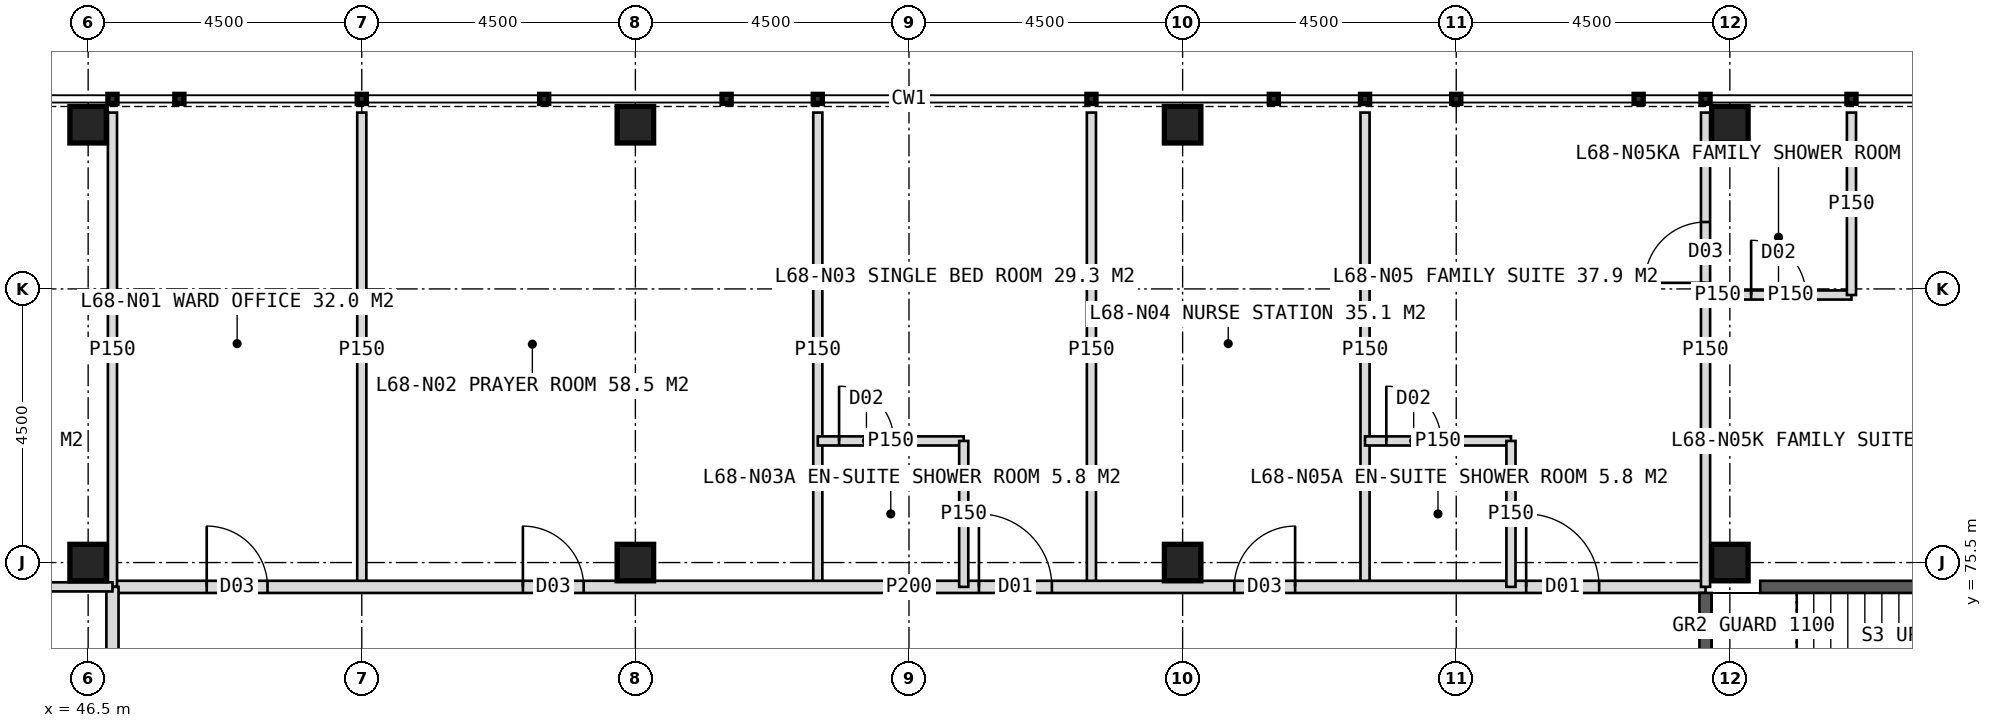
"""IFC4 building model, lengths in metres.
Left out: names, types, materials, properties, quantities, classifications, styles, units other than length and angle.
Written with IfcOpenShell. Run it as: python <this file> out.ifc"""

import sys

from ifc_helpers import new_model, si_unit, direction, frame, frame_2d, origin, origin_2d, place, context, subcontext, project, spatial, rectangle, hollow_rectangle, extrude, element, fill, save


model = new_model("IFC4")
c1 = context("Model", 3, precision=1e-05, world=origin(), true_north=direction((0.0, 1.0)))
c2 = subcontext(c1, "Body", "Model", "MODEL_VIEW")
j1 = project(units=[si_unit("LENGTHUNIT", "METRE"), si_unit("PLANEANGLEUNIT", "RADIAN")], contexts=[c1])
p1 = place(None, origin())
s1 = spatial("IfcSite", under=j1, at=p1, CompositionType="ELEMENT")
p2 = place(p1, origin())
s2 = spatial("IfcBuilding", under=s1, at=p2, CompositionType="ELEMENT")
p3 = place(p2, frame((0.0, 0.0, 282.0)))
s3 = spatial("IfcBuildingStorey", under=s2, at=p3, CompositionType="ELEMENT", Elevation=282.0)
for number, where, z_axis, x_axis in (
    (1, (73.5, 75.5, 0.0), (0.0, 0.0, 1.0), (1.0, 0.0, 0.0)),
    (2, (46.5, 75.5, 0.0), (0.0, 0.0, 1.0), (1.0, 0.0, 0.0)),
    (3, (55.5, 75.5, 0.0), (0.0, 0.0, 1.0), (1.0, 0.0, 0.0)),
    (4, (64.5, 75.5, 0.0), (0.0, 0.0, 1.0), (1.0, 0.0, 0.0)),
    (5, (46.5, 82.7, 0.0), (0.0, 0.0, 1.0), (1.0, 0.0, 0.0)),
    (6, (55.5, 82.7, 0.0), (0.0, 0.0, 1.0), (1.0, 0.0, 0.0)),
    (7, (64.5, 82.7, 0.0), (0.0, 0.0, 1.0), (1.0, 0.0, 0.0)),
    (8, (73.5, 82.7, 0.0), (0.0, 0.0, 1.0), (1.0, 0.0, 0.0)),
):
    element("IfcColumn", number, at=place(p3, frame(where, z_axis=z_axis, x_axis=x_axis)), inside=s3, PredefinedType="COLUMN", context=c2, shape_type="SweptSolid", body=[
        extrude(hollow_rectangle(XDim=0.6, YDim=0.6, WallThickness=0.04, at=origin_2d()), origin(), (0.0, 0.0, 1.0), 4.0),
    ])
for number, where, z_axis, x_axis in (
    (9, (51.0, 75.1, 0.0), (0.0, 0.0, 1.0), (0.0, 1.0, 0.0)),
    (10, (58.5, 75.1, 0.0), (0.0, 0.0, 1.0), (0.0, 1.0, 0.0)),
    (11, (63.0, 75.1, 0.0), (0.0, 0.0, 1.0), (0.0, 1.0, 0.0)),
    (12, (67.5, 75.1, 0.0), (0.0, 0.0, 1.0), (0.0, 1.0, 0.0)),
):
    element("IfcWall", number, at=place(p3, frame(where, z_axis=z_axis, x_axis=x_axis)), inside=s3, PredefinedType="PARTITIONING", context=c2, shape_type="SweptSolid", body=[
        extrude(rectangle(XDim=7.8, YDim=0.15, at=frame_2d((3.9, 0.0))), origin(), (0.0, 0.0, 1.0), 3.75),
    ])
p4 = place(p3, frame((46.9, 75.1, 0.0), z_axis=(0.0, 0.0, 1.0), x_axis=(1.0, 0.0, 0.0)))
e13 = element("IfcWall", 13, at=p4, inside=s3, PredefinedType="PARTITIONING", context=c2, shape_type="SweptSolid", body=[
    extrude(rectangle(XDim=26.2, YDim=0.2, at=frame_2d((13.1, 0.0))), origin(), (0.0, 0.0, 1.0), 3.75),
])
p5 = place(p4, frame((1.55, 0.0, 0.0)))
e14 = element("IfcOpeningElement", 14, at=p5, cuts=e13, PredefinedType="OPENING", context=c2, shape_type="SweptSolid", body=[
    extrude(rectangle(XDim=1.0, YDim=2.1, at=frame_2d((0.5, 1.05))), frame((0.0, 0.11, 0.0), z_axis=(0.0, -1.0, 0.0), x_axis=(1.0, 0.0, 0.0)), (0.0, 0.0, 1.0), 0.22),
])
p6 = place(p4, frame((6.75, 0.0, 0.0)))
e15 = element("IfcOpeningElement", 15, at=p6, cuts=e13, PredefinedType="OPENING", context=c2, shape_type="SweptSolid", body=[
    extrude(rectangle(XDim=1.0, YDim=2.1, at=frame_2d((0.5, 1.05))), frame((0.0, 0.11, 0.0), z_axis=(0.0, -1.0, 0.0), x_axis=(1.0, 0.0, 0.0)), (0.0, 0.0, 1.0), 0.22),
])
p7 = place(p4, frame((14.25, 0.0, 0.0)))
e16 = element("IfcOpeningElement", 16, at=p7, cuts=e13, PredefinedType="OPENING", context=c2, shape_type="SweptSolid", body=[
    extrude(rectangle(XDim=1.2, YDim=2.2, at=frame_2d((0.6, 1.1))), frame((0.0, 0.11, 0.0), z_axis=(0.0, -1.0, 0.0), x_axis=(1.0, 0.0, 0.0)), (0.0, 0.0, 1.0), 0.22),
])
p8 = place(p4, frame((18.45, 0.0, 0.0)))
e17 = element("IfcOpeningElement", 17, at=p8, cuts=e13, PredefinedType="OPENING", context=c2, shape_type="SweptSolid", body=[
    extrude(rectangle(XDim=1.0, YDim=2.1, at=frame_2d((0.5, 1.05))), frame((0.0, 0.11, 0.0), z_axis=(0.0, -1.0, 0.0), x_axis=(1.0, 0.0, 0.0)), (0.0, 0.0, 1.0), 0.22),
])
p9 = place(p4, frame((23.25, 0.0, 0.0)))
e18 = element("IfcOpeningElement", 18, at=p9, cuts=e13, PredefinedType="OPENING", context=c2, shape_type="SweptSolid", body=[
    extrude(rectangle(XDim=1.2, YDim=2.2, at=frame_2d((0.6, 1.1))), frame((0.0, 0.11, 0.0), z_axis=(0.0, -1.0, 0.0), x_axis=(1.0, 0.0, 0.0)), (0.0, 0.0, 1.0), 0.22),
])
p10 = place(p3, frame((46.9, 75.1, 0.0), z_axis=(0.0, 0.0, 1.0), x_axis=(0.0, 1.0, 0.0)))
e19 = element("IfcWall", 19, at=p10, inside=s3, PredefinedType="PARTITIONING", context=c2, shape_type="SweptSolid", body=[
    extrude(rectangle(XDim=7.8, YDim=0.15, at=frame_2d((3.9, 0.0))), origin(), (0.0, 0.0, 1.0), 3.75),
])
p11 = place(p3, frame((58.5, 77.5, 0.0), z_axis=(0.0, 0.0, 1.0), x_axis=(1.0, 0.0, 0.0)))
e20 = element("IfcWall", 20, at=p11, inside=s3, PredefinedType="PARTITIONING", context=c2, shape_type="SweptSolid", body=[
    extrude(rectangle(XDim=2.4, YDim=0.15, at=frame_2d((1.2, 0.0))), origin(), (0.0, 0.0, 1.0), 3.75),
])
p12 = place(p11, frame((0.35, 0.0, 0.0)))
e21 = element("IfcOpeningElement", 21, at=p12, cuts=e20, PredefinedType="OPENING", context=c2, shape_type="SweptSolid", body=[
    extrude(rectangle(XDim=0.9, YDim=2.1, at=frame_2d((0.45, 1.05))), frame((0.0, 0.085, 0.0), z_axis=(0.0, -1.0, 0.0), x_axis=(1.0, 0.0, 0.0)), (0.0, 0.0, 1.0), 0.17),
])
p13 = place(p3, frame((60.9, 75.1, 0.0), z_axis=(0.0, 0.0, 1.0), x_axis=(0.0, 1.0, 0.0)))
e22 = element("IfcWall", 22, at=p13, inside=s3, PredefinedType="PARTITIONING", context=c2, shape_type="SweptSolid", body=[
    extrude(rectangle(XDim=2.4, YDim=0.15, at=frame_2d((1.2, 0.0))), origin(), (0.0, 0.0, 1.0), 3.75),
])
p14 = place(p3, frame((73.1, 75.1, 0.0), z_axis=(0.0, 0.0, 1.0), x_axis=(0.0, 1.0, 0.0)))
e23 = element("IfcWall", 23, at=p14, inside=s3, PredefinedType="PARTITIONING", context=c2, shape_type="SweptSolid", body=[
    extrude(rectangle(XDim=7.8, YDim=0.15, at=frame_2d((3.9, 0.0))), origin(), (0.0, 0.0, 1.0), 3.75),
])
p15 = place(p14, frame((5.0, 0.0, 0.0)))
e24 = element("IfcOpeningElement", 24, at=p15, cuts=e23, PredefinedType="OPENING", context=c2, shape_type="SweptSolid", body=[
    extrude(rectangle(XDim=1.0, YDim=2.1, at=frame_2d((0.5, 1.05))), frame((0.0, 0.085, 0.0), z_axis=(0.0, -1.0, 0.0), x_axis=(1.0, 0.0, 0.0)), (0.0, 0.0, 1.0), 0.17),
])
p16 = place(p3, frame((73.1, 79.9, 0.0), z_axis=(0.0, 0.0, 1.0), x_axis=(1.0, 0.0, 0.0)))
e25 = element("IfcWall", 25, at=p16, inside=s3, PredefinedType="PARTITIONING", context=c2, shape_type="SweptSolid", body=[
    extrude(rectangle(XDim=0.4, YDim=0.15, at=frame_2d((0.2, 0.0))), origin(), (0.0, 0.0, 1.0), 3.75),
])
p17 = place(p3, frame((73.5, 79.9, 0.0), z_axis=(0.0, 0.0, 1.0), x_axis=(1.0, 0.0, 0.0)))
e26 = element("IfcWall", 26, at=p17, inside=s3, PredefinedType="PARTITIONING", context=c2, shape_type="SweptSolid", body=[
    extrude(rectangle(XDim=2.0, YDim=0.15, at=frame_2d((1.0, 0.0))), origin(), (0.0, 0.0, 1.0), 2.95),
])
p18 = place(p17, frame((0.35, 0.0, 0.0)))
e27 = element("IfcOpeningElement", 27, at=p18, cuts=e26, PredefinedType="OPENING", context=c2, shape_type="SweptSolid", body=[
    extrude(rectangle(XDim=0.9, YDim=2.1, at=frame_2d((0.45, 1.05))), frame((0.0, 0.085, 0.0), z_axis=(0.0, -1.0, 0.0), x_axis=(1.0, 0.0, 0.0)), (0.0, 0.0, 1.0), 0.17),
])
p19 = place(p3, frame((75.5, 79.9, 0.0), z_axis=(0.0, 0.0, 1.0), x_axis=(0.0, 1.0, 0.0)))
e28 = element("IfcWall", 28, at=p19, inside=s3, PredefinedType="PARTITIONING", context=c2, shape_type="SweptSolid", body=[
    extrude(rectangle(XDim=3.0, YDim=0.15, at=frame_2d((1.5, 0.0))), origin(), (0.0, 0.0, 1.0), 3.75),
])
p20 = place(p3, frame((67.5, 77.5, 0.0), z_axis=(0.0, 0.0, 1.0), x_axis=(1.0, 0.0, 0.0)))
e29 = element("IfcWall", 29, at=p20, inside=s3, PredefinedType="PARTITIONING", context=c2, shape_type="SweptSolid", body=[
    extrude(rectangle(XDim=2.4, YDim=0.15, at=frame_2d((1.2, 0.0))), origin(), (0.0, 0.0, 1.0), 3.75),
])
p21 = place(p20, frame((0.35, 0.0, 0.0)))
e30 = element("IfcOpeningElement", 30, at=p21, cuts=e29, PredefinedType="OPENING", context=c2, shape_type="SweptSolid", body=[
    extrude(rectangle(XDim=0.9, YDim=2.1, at=frame_2d((0.45, 1.05))), frame((0.0, 0.085, 0.0), z_axis=(0.0, -1.0, 0.0), x_axis=(1.0, 0.0, 0.0)), (0.0, 0.0, 1.0), 0.17),
])
p22 = place(p3, frame((69.9, 75.1, 0.0), z_axis=(0.0, 0.0, 1.0), x_axis=(0.0, 1.0, 0.0)))
e31 = element("IfcWall", 31, at=p22, inside=s3, PredefinedType="PARTITIONING", context=c2, shape_type="SweptSolid", body=[
    extrude(rectangle(XDim=2.4, YDim=0.15, at=frame_2d((1.2, 0.0))), origin(), (0.0, 0.0, 1.0), 3.75),
])
p23 = place(p3, frame((46.9, 48.9, 0.0), z_axis=(0.0, 0.0, 1.0), x_axis=(0.0, 1.0, 0.0)))
e32 = element("IfcWall", 32, at=p23, inside=s3, PredefinedType="PARTITIONING", context=c2, shape_type="SweptSolid", body=[
    extrude(rectangle(XDim=26.2, YDim=0.2, at=frame_2d((13.1, 0.0))), origin(), (0.0, 0.0, 1.0), 3.75),
])
p24 = place(p23, frame((1.55, 0.0, 0.0)))
e33 = element("IfcOpeningElement", 33, at=p24, cuts=e32, PredefinedType="OPENING", context=c2, shape_type="SweptSolid", body=[
    extrude(rectangle(XDim=1.0, YDim=2.1, at=frame_2d((0.5, 1.05))), frame((0.0, 0.11, 0.0), z_axis=(0.0, -1.0, 0.0), x_axis=(1.0, 0.0, 0.0)), (0.0, 0.0, 1.0), 0.22),
])
p25 = place(p23, frame((6.6, 0.0, 0.0)))
e34 = element("IfcOpeningElement", 34, at=p25, cuts=e32, PredefinedType="OPENING", context=c2, shape_type="SweptSolid", body=[
    extrude(rectangle(XDim=1.0, YDim=2.1, at=frame_2d((0.5, 1.05))), frame((0.0, 0.11, 0.0), z_axis=(0.0, -1.0, 0.0), x_axis=(1.0, 0.0, 0.0)), (0.0, 0.0, 1.0), 0.22),
])
p26 = place(p23, frame((11.1, 0.0, 0.0)))
e35 = element("IfcOpeningElement", 35, at=p26, cuts=e32, PredefinedType="OPENING", context=c2, shape_type="SweptSolid", body=[
    extrude(rectangle(XDim=1.0, YDim=2.1, at=frame_2d((0.5, 1.05))), frame((0.0, 0.11, 0.0), z_axis=(0.0, -1.0, 0.0), x_axis=(1.0, 0.0, 0.0)), (0.0, 0.0, 1.0), 0.22),
])
p27 = place(p23, frame((18.45, 0.0, 0.0)))
e36 = element("IfcOpeningElement", 36, at=p27, cuts=e32, PredefinedType="OPENING", context=c2, shape_type="SweptSolid", body=[
    extrude(rectangle(XDim=1.2, YDim=2.2, at=frame_2d((0.6, 1.1))), frame((0.0, 0.11, 0.0), z_axis=(0.0, -1.0, 0.0), x_axis=(1.0, 0.0, 0.0)), (0.0, 0.0, 1.0), 0.22),
])
p28 = place(p23, frame((22.9, 0.0, 0.0)))
e37 = element("IfcOpeningElement", 37, at=p28, cuts=e32, PredefinedType="OPENING", context=c2, shape_type="SweptSolid", body=[
    extrude(rectangle(XDim=1.0, YDim=2.1, at=frame_2d((0.5, 1.05))), frame((0.0, 0.11, 0.0), z_axis=(0.0, -1.0, 0.0), x_axis=(1.0, 0.0, 0.0)), (0.0, 0.0, 1.0), 0.22),
])
p29 = place(p3, frame((46.9, 75.1, 0.0), z_axis=(0.0, 0.0, 1.0), x_axis=(-1.0, 0.0, 0.0)))
e38 = element("IfcWall", 38, at=p29, inside=s3, PredefinedType="PARTITIONING", context=c2, shape_type="SweptSolid", body=[
    extrude(rectangle(XDim=7.8, YDim=0.15, at=frame_2d((3.9, 0.0))), origin(), (0.0, 0.0, 1.0), 3.75),
])
p30 = place(p29, frame((5.0, 0.0, 0.0)))
e39 = element("IfcOpeningElement", 39, at=p30, cuts=e38, PredefinedType="OPENING", context=c2, shape_type="SweptSolid", body=[
    extrude(rectangle(XDim=1.0, YDim=2.1, at=frame_2d((0.5, 1.05))), frame((0.0, 0.085, 0.0), z_axis=(0.0, -1.0, 0.0), x_axis=(1.0, 0.0, 0.0)), (0.0, 0.0, 1.0), 0.17),
])
p31 = place(p3, frame((73.1, 75.0, 0.0), z_axis=(0.0, 0.0, 1.0), x_axis=(0.0, -1.0, 0.0)))
e40 = element("IfcWall", 40, at=p31, inside=s3, PredefinedType="SOLIDWALL", context=c2, shape_type="SweptSolid", body=[
    extrude(rectangle(XDim=4.0, YDim=0.2, at=frame_2d((2.0, 0.0))), origin(), (0.0, 0.0, 1.0), 3.75),
])
p32 = place(p31, frame((1.5, 0.0, 0.0)))
e41 = element("IfcOpeningElement", 41, at=p32, cuts=e40, PredefinedType="OPENING", context=c2, shape_type="SweptSolid", body=[
    extrude(rectangle(XDim=1.2, YDim=2.1, at=frame_2d((0.6, 1.05))), frame((0.0, 0.11, 0.0), z_axis=(0.0, -1.0, 0.0), x_axis=(1.0, 0.0, 0.0)), (0.0, 0.0, 1.0), 0.22),
])
p33 = place(p3, frame((74.0, 75.1, 0.0), z_axis=(0.0, 0.0, 1.0), x_axis=(1.0, 0.0, 0.0)))
e42 = element("IfcWall", 42, at=p33, inside=s3, PredefinedType="SOLIDWALL", context=c2, shape_type="SweptSolid", body=[
    extrude(rectangle(XDim=6.15, YDim=0.2, at=frame_2d((3.075, 0.0))), origin(), (0.0, 0.0, 1.0), 3.75),
])
p34 = place(p5, origin())
e43 = element("IfcDoor", 43, at=p34, inside=s3, OperationType="SINGLE_SWING_LEFT", PredefinedType="DOOR", context=c2, shape_type="SweptSolid", body=[
    extrude(rectangle(XDim=1.0, YDim=2.1, at=frame_2d((0.5, 1.05))), frame((0.0, 0.025, 0.0), z_axis=(0.0, -1.0, 0.0), x_axis=(1.0, 0.0, 0.0)), (0.0, 0.0, 1.0), 0.05),
])
fill(e14, e43)
p35 = place(p6, origin())
e44 = element("IfcDoor", 44, at=p35, inside=s3, OperationType="SINGLE_SWING_LEFT", PredefinedType="DOOR", context=c2, shape_type="SweptSolid", body=[
    extrude(rectangle(XDim=1.0, YDim=2.1, at=frame_2d((0.5, 1.05))), frame((0.0, 0.025, 0.0), z_axis=(0.0, -1.0, 0.0), x_axis=(1.0, 0.0, 0.0)), (0.0, 0.0, 1.0), 0.05),
])
fill(e15, e44)
p36 = place(p7, origin())
e45 = element("IfcDoor", 45, at=p36, inside=s3, OperationType="SINGLE_SWING_LEFT", PredefinedType="DOOR", context=c2, shape_type="SweptSolid", body=[
    extrude(rectangle(XDim=1.2, YDim=2.2, at=frame_2d((0.6, 1.1))), frame((0.0, 0.025, 0.0), z_axis=(0.0, -1.0, 0.0), x_axis=(1.0, 0.0, 0.0)), (0.0, 0.0, 1.0), 0.05),
])
fill(e16, e45)
p37 = place(p12, origin())
e46 = element("IfcDoor", 46, at=p37, inside=s3, OperationType="SINGLE_SWING_LEFT", PredefinedType="DOOR", context=c2, shape_type="SweptSolid", body=[
    extrude(rectangle(XDim=0.9, YDim=2.1, at=frame_2d((0.45, 1.05))), frame((0.0, 0.025, 0.0), z_axis=(0.0, -1.0, 0.0), x_axis=(1.0, 0.0, 0.0)), (0.0, 0.0, 1.0), 0.05),
])
fill(e21, e46)
p38 = place(p8, origin())
e47 = element("IfcDoor", 47, at=p38, inside=s3, OperationType="SINGLE_SWING_RIGHT", PredefinedType="DOOR", context=c2, shape_type="SweptSolid", body=[
    extrude(rectangle(XDim=1.0, YDim=2.1, at=frame_2d((0.5, 1.05))), frame((0.0, 0.025, 0.0), z_axis=(0.0, -1.0, 0.0), x_axis=(1.0, 0.0, 0.0)), (0.0, 0.0, 1.0), 0.05),
])
fill(e17, e47)
p39 = place(p18, origin())
e48 = element("IfcDoor", 48, at=p39, inside=s3, OperationType="SINGLE_SWING_LEFT", PredefinedType="DOOR", context=c2, shape_type="SweptSolid", body=[
    extrude(rectangle(XDim=0.9, YDim=2.1, at=frame_2d((0.45, 1.05))), frame((0.0, 0.025, 0.0), z_axis=(0.0, -1.0, 0.0), x_axis=(1.0, 0.0, 0.0)), (0.0, 0.0, 1.0), 0.05),
])
fill(e27, e48)
p40 = place(p15, origin())
e49 = element("IfcDoor", 49, at=p40, inside=s3, OperationType="SINGLE_SWING_LEFT", PredefinedType="DOOR", context=c2, shape_type="SweptSolid", body=[
    extrude(rectangle(XDim=1.0, YDim=2.1, at=frame_2d((0.5, 1.05))), frame((0.0, 0.025, 0.0), z_axis=(0.0, -1.0, 0.0), x_axis=(1.0, 0.0, 0.0)), (0.0, 0.0, 1.0), 0.05),
])
fill(e24, e49)
p41 = place(p9, origin())
e50 = element("IfcDoor", 50, at=p41, inside=s3, OperationType="SINGLE_SWING_LEFT", PredefinedType="DOOR", context=c2, shape_type="SweptSolid", body=[
    extrude(rectangle(XDim=1.2, YDim=2.2, at=frame_2d((0.6, 1.1))), frame((0.0, 0.025, 0.0), z_axis=(0.0, -1.0, 0.0), x_axis=(1.0, 0.0, 0.0)), (0.0, 0.0, 1.0), 0.05),
])
fill(e18, e50)
p42 = place(p21, origin())
e51 = element("IfcDoor", 51, at=p42, inside=s3, OperationType="SINGLE_SWING_LEFT", PredefinedType="DOOR", context=c2, shape_type="SweptSolid", body=[
    extrude(rectangle(XDim=0.9, YDim=2.1, at=frame_2d((0.45, 1.05))), frame((0.0, 0.025, 0.0), z_axis=(0.0, -1.0, 0.0), x_axis=(1.0, 0.0, 0.0)), (0.0, 0.0, 1.0), 0.05),
])
fill(e30, e51)
save(model, sys.argv[1])
